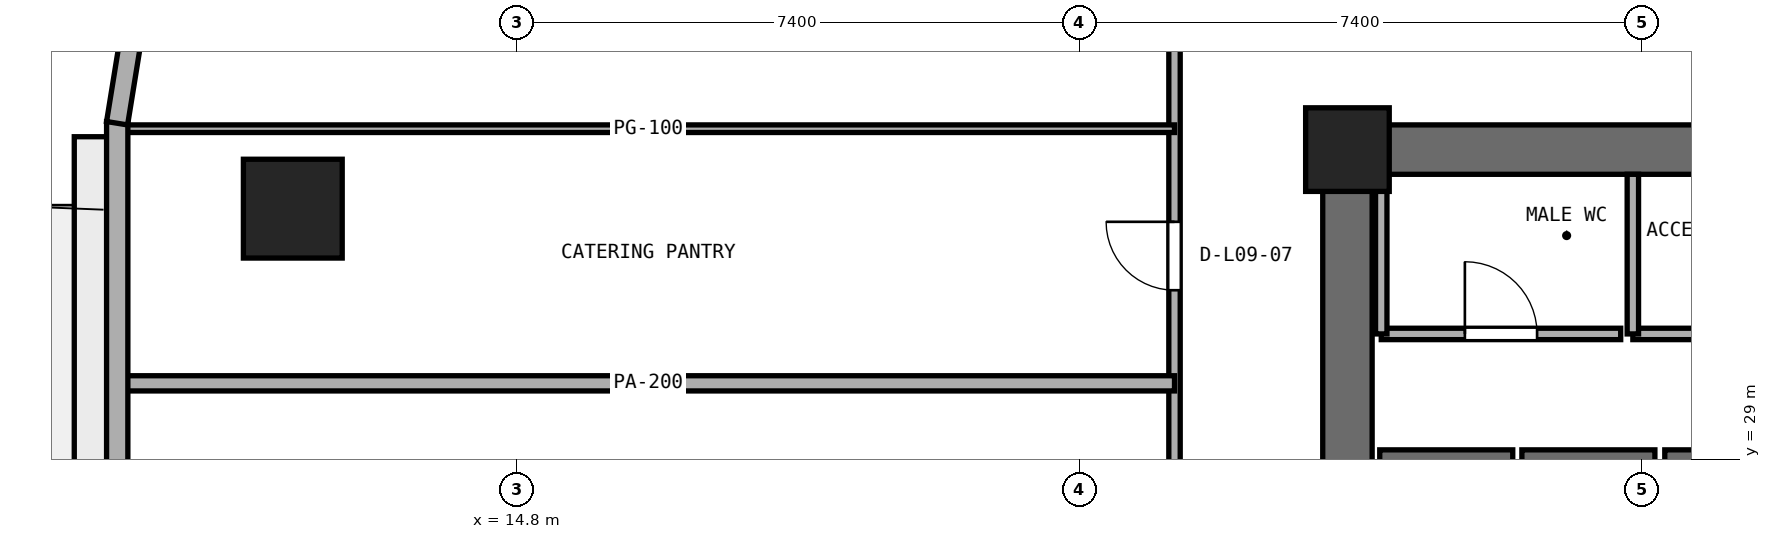
"""IFC4 building model, lengths in metres.
Left out: names, types, materials, properties, quantities, classifications, styles, units other than length and angle.
Written with IfcOpenShell. Run it as: python <this file> out.ifc"""

import sys

from ifc_helpers import new_model, si_unit, direction, frame, frame_2d, origin, origin_2d, place, context, subcontext, project, spatial, rectangle, extrude, element, fill, save


model = new_model("IFC4")
c1 = context("Model", 3, precision=1e-05, world=origin(), true_north=direction((0.0, 1.0)))
c2 = subcontext(c1, "Body", "Model", "MODEL_VIEW")
j1 = project(units=[si_unit("LENGTHUNIT", "METRE"), si_unit("PLANEANGLEUNIT", "RADIAN")], contexts=[c1])
p1 = place(None, origin())
s1 = spatial("IfcSite", under=j1, at=p1, CompositionType="ELEMENT")
p2 = place(p1, origin())
s2 = spatial("IfcBuilding", under=s1, at=p2, CompositionType="ELEMENT")
p3 = place(p2, frame((0.0, 0.0, 40.2)))
s3 = spatial("IfcBuildingStorey", under=s2, at=p3, CompositionType="ELEMENT", Elevation=40.2)
p4 = place(p3, frame((25.4, 33.075, 0.0), z_axis=(0.0, 0.0, 1.0), x_axis=(1.0, 0.0, 0.0)))
e1 = element("IfcWall", 1, at=p4, inside=s3, PredefinedType="SHEAR", context=c2, shape_type="SweptSolid", body=[
    extrude(rectangle(XDim=23.2, YDim=0.65, at=frame_2d((11.6, 0.0))), origin(), (0.0, 0.0, 1.0), 3.525),
])
p5 = place(p3, frame((25.725, 17.65, 0.0), z_axis=(0.0, 0.0, 1.0), x_axis=(0.0, 1.0, 0.0)))
e2 = element("IfcWall", 2, at=p5, inside=s3, PredefinedType="SHEAR", context=c2, shape_type="SweptSolid", body=[
    extrude(rectangle(XDim=15.1, YDim=0.65, at=frame_2d((7.55, 0.0))), origin(), (0.0, 0.0, 1.0), 3.525),
])
p6 = place(p5, frame((6.8, 0.0, 0.0)))
e3 = element("IfcOpeningElement", 3, at=p6, cuts=e2, PredefinedType="OPENING", context=c2, shape_type="SweptSolid", body=[
    extrude(rectangle(XDim=1.5, YDim=2.15, at=frame_2d((0.75, 1.075))), frame((0.0, 0.335, 0.0), z_axis=(0.0, -1.0, 0.0), x_axis=(1.0, 0.0, 0.0)), (0.0, 0.0, 1.0), 0.67),
])
p7 = place(p3, frame((25.725, 33.075, 0.0), z_axis=(0.0, 0.0, 1.0), x_axis=(1.0, 0.0, 0.0)))
e4 = element("IfcColumn", 4, at=p7, inside=s3, PredefinedType="PILASTER", context=c2, shape_type="SweptSolid", body=[
    extrude(rectangle(XDim=1.1, YDim=1.1, at=origin_2d()), origin(), (0.0, 0.0, 1.0), 3.8),
])
p8 = place(p3, frame((11.85, 32.298, 0.0), z_axis=(0.0, 0.0, 1.0), x_axis=(1.0, 0.0, 0.0)))
e5 = element("IfcColumn", 5, at=p8, inside=s3, PredefinedType="COLUMN", context=c2, shape_type="SweptSolid", body=[
    extrude(rectangle(XDim=1.3, YDim=1.3, at=origin_2d()), origin(), (0.0, 0.0, 1.0), 3.8),
])
for number, where, z_axis, x_axis in (
    (6, (26.15, 29.0, 0.0), (0.0, 0.0, 1.0), (1.0, 0.0, 0.0)),
    (7, (28.02, 29.0, 0.0), (0.0, 0.0, 1.0), (1.0, 0.0, 0.0)),
):
    element("IfcWall", number, at=place(p3, frame(where, z_axis=z_axis, x_axis=x_axis)), inside=s3, PredefinedType="SHEAR", context=c2, shape_type="SweptSolid", body=[
        extrude(rectangle(XDim=1.75, YDim=0.25, at=frame_2d((0.875, 0.0))), origin(), (0.0, 0.0, 1.0), 3.525),
    ])
p9 = place(p3, frame((29.9, 29.0, 0.0), z_axis=(0.0, 0.0, 1.0), x_axis=(1.0, 0.0, 0.0)))
e8 = element("IfcWall", 8, at=p9, inside=s3, PredefinedType="SHEAR", context=c2, shape_type="SweptSolid", body=[
    extrude(rectangle(XDim=1.72, YDim=0.25, at=frame_2d((0.86, 0.0))), origin(), (0.0, 0.0, 1.0), 3.525),
])
p10 = place(p3, frame((26.17, 30.65, 0.0), z_axis=(0.0, 0.0, 1.0), x_axis=(1.0, 0.0, 0.0)))
e9 = element("IfcWall", 9, at=p10, inside=s3, PredefinedType="PARTITIONING", context=c2, shape_type="SweptSolid", body=[
    extrude(rectangle(XDim=3.15, YDim=0.15, at=frame_2d((1.575, 0.0))), origin(), (0.0, 0.0, 1.0), 3.525),
])
p11 = place(p10, frame((1.1, 0.0, 0.0)))
e10 = element("IfcOpeningElement", 10, at=p11, cuts=e9, PredefinedType="OPENING", context=c2, shape_type="SweptSolid", body=[
    extrude(rectangle(XDim=0.95, YDim=2.1, at=frame_2d((0.475, 1.05))), frame((0.0, 0.085, 0.0), z_axis=(0.0, -1.0, 0.0), x_axis=(1.0, 0.0, 0.0)), (0.0, 0.0, 1.0), 0.17),
])
p12 = place(p3, frame((26.17, 30.65, 0.0), z_axis=(0.0, 0.0, 1.0), x_axis=(0.0, 1.0, 0.0)))
e11 = element("IfcWall", 11, at=p12, inside=s3, PredefinedType="PARTITIONING", context=c2, shape_type="SweptSolid", body=[
    extrude(rectangle(XDim=2.1, YDim=0.15, at=frame_2d((1.05, 0.0))), origin(), (0.0, 0.0, 1.0), 3.525),
])
p13 = place(p3, frame((29.48, 30.65, 0.0), z_axis=(0.0, 0.0, 1.0), x_axis=(1.0, 0.0, 0.0)))
e12 = element("IfcWall", 12, at=p13, inside=s3, PredefinedType="PARTITIONING", context=c2, shape_type="SweptSolid", body=[
    extrude(rectangle(XDim=3.19, YDim=0.15, at=frame_2d((1.595, 0.0))), origin(), (0.0, 0.0, 1.0), 3.525),
])
p14 = place(p13, frame((1.12, 0.0, 0.0)))
e13 = element("IfcOpeningElement", 13, at=p14, cuts=e12, PredefinedType="OPENING", context=c2, shape_type="SweptSolid", body=[
    extrude(rectangle(XDim=0.95, YDim=2.1, at=frame_2d((0.475, 1.05))), frame((0.0, 0.085, 0.0), z_axis=(0.0, -1.0, 0.0), x_axis=(1.0, 0.0, 0.0)), (0.0, 0.0, 1.0), 0.17),
])
p15 = place(p3, frame((29.48, 30.65, 0.0), z_axis=(0.0, 0.0, 1.0), x_axis=(0.0, 1.0, 0.0)))
e14 = element("IfcWall", 14, at=p15, inside=s3, PredefinedType="PARTITIONING", context=c2, shape_type="SweptSolid", body=[
    extrude(rectangle(XDim=2.1, YDim=0.15, at=frame_2d((1.05, 0.0))), origin(), (0.0, 0.0, 1.0), 3.525),
])
p16 = place(p3, frame((23.45, 15.05, 0.0), z_axis=(0.0, 0.0, 1.0), x_axis=(0.0, 1.0, 0.0)))
e15 = element("IfcWall", 15, at=p16, inside=s3, PredefinedType="PARTITIONING", context=c2, shape_type="SweptSolid", body=[
    extrude(rectangle(XDim=20.3, YDim=0.15, at=frame_2d((10.15, 0.0))), origin(), (0.0, 0.0, 1.0), 3.525),
])
p17 = place(p16, frame((8.025, 0.0, 0.0)))
e16 = element("IfcOpeningElement", 16, at=p17, cuts=e15, PredefinedType="OPENING", context=c2, shape_type="SweptSolid", body=[
    extrude(rectangle(XDim=0.9, YDim=2.1, at=frame_2d((0.45, 1.05))), frame((0.0, 0.085, 0.0), z_axis=(0.0, -1.0, 0.0), x_axis=(1.0, 0.0, 0.0)), (0.0, 0.0, 1.0), 0.17),
])
p18 = place(p16, frame((16.175, 0.0, 0.0)))
e17 = element("IfcOpeningElement", 17, at=p18, cuts=e15, PredefinedType="OPENING", context=c2, shape_type="SweptSolid", body=[
    extrude(rectangle(XDim=0.9, YDim=2.1, at=frame_2d((0.45, 1.05))), frame((0.0, 0.085, 0.0), z_axis=(0.0, -1.0, 0.0), x_axis=(1.0, 0.0, 0.0)), (0.0, 0.0, 1.0), 0.17),
])
p19 = place(p3, frame((9.605, 30.0, 0.0), z_axis=(0.0, 0.0, 1.0), x_axis=(1.0, 0.0, 0.0)))
e18 = element("IfcWall", 18, at=p19, inside=s3, PredefinedType="PARTITIONING", context=c2, shape_type="SweptSolid", body=[
    extrude(rectangle(XDim=13.845, YDim=0.2, at=frame_2d((6.922, 0.0))), origin(), (0.0, 0.0, 1.0), 3.525),
])
p20 = place(p3, frame((9.605, 33.35, 0.0), z_axis=(0.0, 0.0, 1.0), x_axis=(1.0, 0.0, 0.0)))
e19 = element("IfcWall", 19, at=p20, inside=s3, PredefinedType="PARTITIONING", context=c2, shape_type="SweptSolid", body=[
    extrude(rectangle(XDim=13.845, YDim=0.1, at=frame_2d((6.922, 0.0))), origin(), (0.0, 0.0, 1.0), 3.525),
])
p21 = place(p3, frame((9.54, 33.444, 0.0), z_axis=(0.0, 0.0, 1.0), x_axis=(0.0, -1.0, 0.0)))
e20 = element("IfcWall", 20, at=p21, inside=s3, PredefinedType="STANDARD", context=c2, shape_type="SweptSolid", body=[
    extrude(rectangle(XDim=17.301, YDim=0.28, at=frame_2d((8.65, 0.0))), origin(), (0.0, 0.0, 1.0), 3.525),
])
p22 = place(p21, frame((8.1, 0.0, 0.0)))
e21 = element("IfcOpeningElement", 21, at=p22, cuts=e20, PredefinedType="OPENING", context=c2, shape_type="SweptSolid", body=[
    extrude(rectangle(XDim=1.1, YDim=2.2, at=frame_2d((0.55, 1.1))), frame((0.0, 0.15, 0.0), z_axis=(0.0, -1.0, 0.0), x_axis=(1.0, 0.0, 0.0)), (0.0, 0.0, 1.0), 0.3),
])
p23 = place(p21, frame((12.884, 0.0, 0.9)))
e22 = element("IfcOpeningElement", 22, at=p23, cuts=e20, PredefinedType="OPENING", context=c2, shape_type="SweptSolid", body=[
    extrude(rectangle(XDim=2.4, YDim=1.75, at=frame_2d((1.2, 0.875))), frame((0.0, 0.15, 0.0), z_axis=(0.0, -1.0, 0.0), x_axis=(1.0, 0.0, 0.0)), (0.0, 0.0, 1.0), 0.3),
])
p24 = place(p3, frame((9.753, 34.749, 0.0), z_axis=(0.0, 0.0, 1.0), x_axis=(-0.160037671962, -0.987110907423, 0.0)))
e23 = element("IfcWall", 23, at=p24, inside=s3, PredefinedType="STANDARD", context=c2, shape_type="SweptSolid", body=[
    extrude(rectangle(XDim=1.344, YDim=0.28, at=frame_2d((0.672, 0.0))), origin(), (0.0, 0.0, 1.0), 3.525),
])
p25 = place(p11, origin())
e24 = element("IfcDoor", 24, at=p25, inside=s3, OperationType="SINGLE_SWING_LEFT", PredefinedType="DOOR", context=c2, shape_type="SweptSolid", body=[
    extrude(rectangle(XDim=0.95, YDim=2.1, at=frame_2d((0.475, 1.05))), frame((0.0, 0.025, 0.0), z_axis=(0.0, -1.0, 0.0), x_axis=(1.0, 0.0, 0.0)), (0.0, 0.0, 1.0), 0.05),
])
fill(e10, e24)
p26 = place(p18, origin())
e25 = element("IfcDoor", 25, at=p26, inside=s3, OperationType="SINGLE_SWING_RIGHT", PredefinedType="DOOR", context=c2, shape_type="SweptSolid", body=[
    extrude(rectangle(XDim=0.9, YDim=2.1, at=frame_2d((0.45, 1.05))), frame((0.0, 0.025, 0.0), z_axis=(0.0, -1.0, 0.0), x_axis=(1.0, 0.0, 0.0)), (0.0, 0.0, 1.0), 0.05),
])
fill(e17, e25)
save(model, sys.argv[1])
